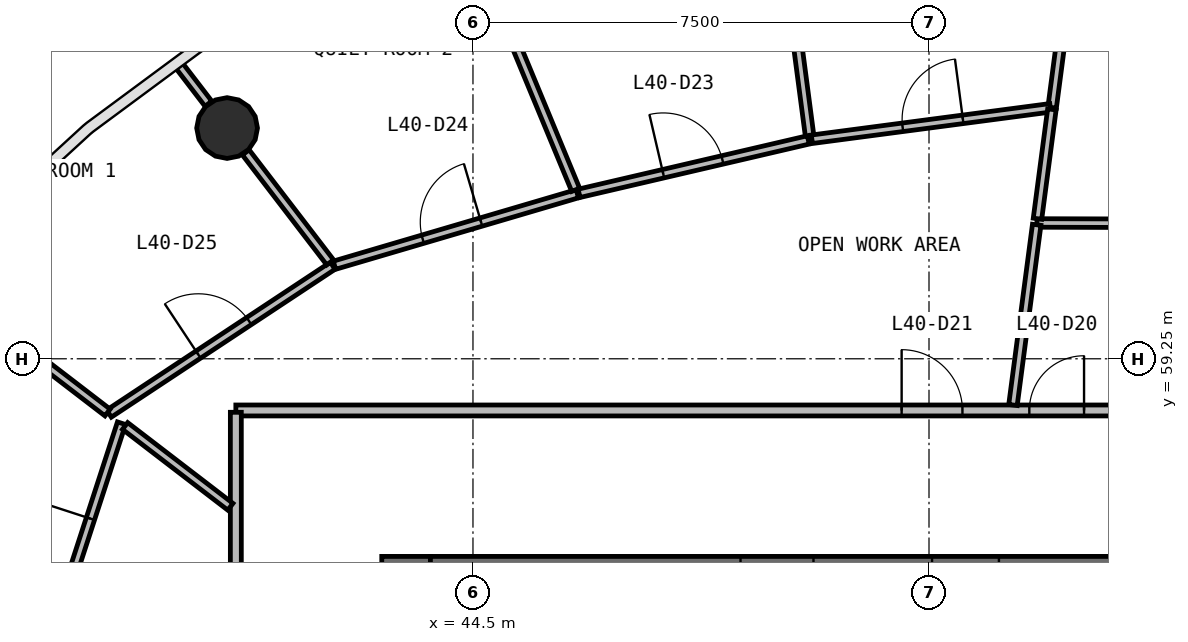
"""IFC4 building model, lengths in metres.
Left out: names, types, materials, properties, quantities, classifications, styles, units other than length and angle.
Written with IfcOpenShell. Run it as: python <this file> out.ifc"""

import sys

from ifc_helpers import new_model, si_unit, direction, frame, frame_2d, origin, origin_2d, place, context, subcontext, project, spatial, rectangle, circle, extrude, source, transform, mapped, element, fill, save


model = new_model("IFC4")
c1 = context("Model", 3, precision=1e-05, world=origin(), true_north=direction((0.0, 1.0)))
c2 = subcontext(c1, "Body", "Model", "MODEL_VIEW")
j1 = project(units=[si_unit("LENGTHUNIT", "METRE"), si_unit("PLANEANGLEUNIT", "RADIAN")], contexts=[c1])
p1 = place(None, origin())
s1 = spatial("IfcSite", under=j1, at=p1, CompositionType="ELEMENT")
p2 = place(p1, origin())
s2 = spatial("IfcBuilding", under=s1, at=p2, CompositionType="ELEMENT")
p3 = place(p2, frame((0.0, 0.0, 168.2)))
s3 = spatial("IfcBuildingStorey", under=s2, at=p3, CompositionType="ELEMENT", Elevation=168.2)
p4 = place(p3, frame((43.4, 56.0, 0.0), z_axis=(0.0, 0.0, 1.0), x_axis=(0.0, -1.0, 0.0)))
e1 = element("IfcWall", 1, at=p4, inside=s3, PredefinedType="SHEAR", context=c2, shape_type="SweptSolid", body=[
    extrude(rectangle(XDim=16.0, YDim=0.8, at=frame_2d((8.0, 0.0))), origin(), (0.0, 0.0, 1.0), 3.9),
])
p5 = place(p4, frame((7.1, 0.0, 0.0)))
e2 = element("IfcOpeningElement", 2, at=p5, cuts=e1, PredefinedType="OPENING", context=c2, shape_type="SweptSolid", body=[
    extrude(rectangle(XDim=1.8, YDim=2.1, at=frame_2d((0.9, 1.05))), frame((0.0, 0.41, 0.0), z_axis=(0.0, -1.0, 0.0), x_axis=(1.0, 0.0, 0.0)), (0.0, 0.0, 1.0), 0.82),
])
p6 = place(p3, frame((60.2, 55.6, 0.0), z_axis=(0.0, 0.0, 1.0), x_axis=(-1.0, 0.0, 0.0)))
e3 = element("IfcWall", 3, at=p6, inside=s3, PredefinedType="SHEAR", context=c2, shape_type="SweptSolid", body=[
    extrude(rectangle(XDim=16.4, YDim=0.8, at=frame_2d((8.2, 0.0))), origin(), (0.0, 0.0, 1.0), 3.9),
])
p7 = place(p6, frame((0.2, 0.0, 0.0)))
e4 = element("IfcOpeningElement", 4, at=p7, cuts=e3, PredefinedType="OPENING", context=c2, shape_type="SweptSolid", body=[
    extrude(rectangle(XDim=1.1, YDim=2.1, at=frame_2d((0.55, 1.05))), frame((0.0, 0.41, 0.0), z_axis=(0.0, -1.0, 0.0), x_axis=(1.0, 0.0, 0.0)), (0.0, 0.0, 1.0), 0.82),
])
p8 = place(p6, frame((10.1, 0.0, 0.0)))
e5 = element("IfcOpeningElement", 5, at=p8, cuts=e3, PredefinedType="OPENING", context=c2, shape_type="SweptSolid", body=[
    extrude(rectangle(XDim=1.2, YDim=2.1, at=frame_2d((0.6, 1.05))), frame((0.0, 0.41, 0.0), z_axis=(0.0, -1.0, 0.0), x_axis=(1.0, 0.0, 0.0)), (0.0, 0.0, 1.0), 0.82),
])
p9 = place(p6, frame((7.05, 0.0, 0.0)))
e6 = element("IfcOpeningElement", 6, at=p9, cuts=e3, PredefinedType="OPENING", context=c2, shape_type="SweptSolid", body=[
    extrude(rectangle(XDim=1.1, YDim=2.1, at=frame_2d((0.55, 1.05))), frame((0.0, 0.41, 0.0), z_axis=(0.0, -1.0, 0.0), x_axis=(1.0, 0.0, 0.0)), (0.0, 0.0, 1.0), 0.82),
])
m1 = source(origin(), c2, "Body", "SweptSolid", [
    extrude(circle(Radius=0.5, at=origin_2d()), origin(), (0.0, 0.0, 1.0), 3.9),
])
p10 = place(p3, frame((40.456, 63.044, 0.0), z_axis=(0.0, 0.0, 1.0), x_axis=(1.0, 0.0, 0.0)))
e7 = element("IfcColumn", 7, at=p10, inside=s3, PredefinedType="COLUMN", context=c2, shape_type="MappedRepresentation", body=[
    mapped(m1, transform((0.0, 0.0, 0.0), scale=1.0)),
])
p11 = place(p3, frame((40.6, 58.4, 0.0), z_axis=(0.0, 0.0, 1.0), x_axis=(1.0, 0.0, 0.0)))
e8 = element("IfcWall", 8, at=p11, inside=s3, PredefinedType="PARTITIONING", context=c2, shape_type="SweptSolid", body=[
    extrude(rectangle(XDim=22.8, YDim=0.18, at=frame_2d((11.4, 0.0))), origin(), (0.0, 0.0, 1.0), 2.88),
])
p12 = place(p11, frame((16.05, 0.0, 0.0)))
e9 = element("IfcOpeningElement", 9, at=p12, cuts=e8, PredefinedType="OPENING", context=c2, shape_type="SweptSolid", body=[
    extrude(rectangle(XDim=0.9, YDim=2.1, at=frame_2d((0.45, 1.05))), frame((0.0, 0.1, 0.0), z_axis=(0.0, -1.0, 0.0), x_axis=(1.0, 0.0, 0.0)), (0.0, 0.0, 1.0), 0.2),
])
p13 = place(p11, frame((13.05, 0.0, 0.0)))
e10 = element("IfcOpeningElement", 10, at=p13, cuts=e8, PredefinedType="OPENING", context=c2, shape_type="SweptSolid", body=[
    extrude(rectangle(XDim=0.9, YDim=2.1, at=frame_2d((0.45, 1.05))), frame((0.0, 0.1, 0.0), z_axis=(0.0, -1.0, 0.0), x_axis=(1.0, 0.0, 0.0)), (0.0, 0.0, 1.0), 0.2),
])
p14 = place(p11, frame((10.95, 0.0, 0.0)))
e11 = element("IfcOpeningElement", 11, at=p14, cuts=e8, PredefinedType="OPENING", context=c2, shape_type="SweptSolid", body=[
    extrude(rectangle(XDim=1.0, YDim=2.1, at=frame_2d((0.5, 1.05))), frame((0.0, 0.1, 0.0), z_axis=(0.0, -1.0, 0.0), x_axis=(1.0, 0.0, 0.0)), (0.0, 0.0, 1.0), 0.2),
])
p15 = place(p11, frame((19.95, 0.0, 0.0)))
e12 = element("IfcOpeningElement", 12, at=p15, cuts=e8, PredefinedType="OPENING", context=c2, shape_type="SweptSolid", body=[
    extrude(rectangle(XDim=1.0, YDim=2.1, at=frame_2d((0.5, 1.05))), frame((0.0, 0.1, 0.0), z_axis=(0.0, -1.0, 0.0), x_axis=(1.0, 0.0, 0.0)), (0.0, 0.0, 1.0), 0.2),
])
p16 = place(p3, frame((40.6, 37.63, 0.0), z_axis=(0.0, 0.0, 1.0), x_axis=(0.0, 1.0, 0.0)))
e13 = element("IfcWall", 13, at=p16, inside=s3, PredefinedType="PARTITIONING", context=c2, shape_type="SweptSolid", body=[
    extrude(rectangle(XDim=20.74, YDim=0.18, at=frame_2d((10.37, 0.0))), origin(), (0.0, 0.0, 1.0), 2.88),
])
p17 = place(p16, frame((12.09, 0.0, 0.0)))
e14 = element("IfcOpeningElement", 14, at=p17, cuts=e13, PredefinedType="OPENING", context=c2, shape_type="SweptSolid", body=[
    extrude(rectangle(XDim=1.0, YDim=2.1, at=frame_2d((0.5, 1.05))), frame((0.0, 0.1, 0.0), z_axis=(0.0, -1.0, 0.0), x_axis=(1.0, 0.0, 0.0)), (0.0, 0.0, 1.0), 0.2),
])
p18 = place(p16, frame((9.89, 0.0, 0.0)))
e15 = element("IfcOpeningElement", 15, at=p18, cuts=e13, PredefinedType="OPENING", context=c2, shape_type="SweptSolid", body=[
    extrude(rectangle(XDim=1.0, YDim=2.1, at=frame_2d((0.5, 1.05))), frame((0.0, 0.1, 0.0), z_axis=(0.0, -1.0, 0.0), x_axis=(1.0, 0.0, 0.0)), (0.0, 0.0, 1.0), 0.2),
])
p19 = place(p3, frame((54.66, 68.205, 0.0), z_axis=(0.0, 0.0, 1.0), x_axis=(-0.130559647123, -0.991440456378, 0.0)))
e16 = element("IfcWall", 16, at=p19, inside=s3, PredefinedType="PARTITIONING", context=c2, shape_type="SweptSolid", body=[
    extrude(rectangle(XDim=4.866, YDim=0.14, at=frame_2d((2.433, 0.0))), origin(), (0.0, 0.0, 1.0), 2.88),
])
p20 = place(p19, frame((2.016, 0.0, 0.0)))
e17 = element("IfcOpeningElement", 17, at=p20, cuts=e16, PredefinedType="OPENING", context=c2, shape_type="SweptSolid", body=[
    extrude(rectangle(XDim=1.0, YDim=2.1, at=frame_2d((0.5, 1.05))), frame((0.0, 0.08, 0.0), z_axis=(0.0, -1.0, 0.0), x_axis=(1.0, 0.0, 0.0)), (0.0, 0.0, 1.0), 0.16),
])
p21 = place(p3, frame((38.514, 58.348, 0.0), z_axis=(0.0, 0.0, 1.0), x_axis=(0.834249384929, 0.551387308292, 0.0)))
e18 = element("IfcWall", 18, at=p21, inside=s3, PredefinedType="PARTITIONING", context=c2, shape_type="SweptSolid", body=[
    extrude(rectangle(XDim=4.41, YDim=0.14, at=frame_2d((2.205, 0.0))), origin(), (0.0, 0.0, 1.0), 2.88),
])
p22 = place(p21, frame((1.76, 0.0, 0.0)))
e19 = element("IfcOpeningElement", 19, at=p22, cuts=e18, PredefinedType="OPENING", context=c2, shape_type="SweptSolid", body=[
    extrude(rectangle(XDim=1.0, YDim=2.1, at=frame_2d((0.5, 1.05))), frame((0.0, 0.08, 0.0), z_axis=(0.0, -1.0, 0.0), x_axis=(1.0, 0.0, 0.0)), (0.0, 0.0, 1.0), 0.16),
])
p23 = place(p3, frame((37.375, 54.058, 0.0), z_axis=(0.0, 0.0, 1.0), x_axis=(0.309393484324, 0.950934104898, 0.0)))
e20 = element("IfcWall", 20, at=p23, inside=s3, PredefinedType="PARTITIONING", context=c2, shape_type="SweptSolid", body=[
    extrude(rectangle(XDim=4.345, YDim=0.14, at=frame_2d((2.173, 0.0))), origin(), (0.0, 0.0, 1.0), 2.88),
])
p24 = place(p23, frame((1.696, 0.0, 0.0)))
e21 = element("IfcOpeningElement", 21, at=p24, cuts=e20, PredefinedType="OPENING", context=c2, shape_type="SweptSolid", body=[
    extrude(rectangle(XDim=1.0, YDim=2.1, at=frame_2d((0.5, 1.05))), frame((0.0, 0.08, 0.0), z_axis=(0.0, -1.0, 0.0), x_axis=(1.0, 0.0, 0.0)), (0.0, 0.0, 1.0), 0.16),
])
p25 = place(p3, frame((50.044, 62.856, 0.0), z_axis=(0.0, 0.0, 1.0), x_axis=(-0.130515707309, 0.991446241682, 0.0)))
e22 = element("IfcWall", 22, at=p25, inside=s3, PredefinedType="PARTITIONING", context=c2, shape_type="SweptSolid", body=[
    extrude(rectangle(XDim=4.231, YDim=0.14, at=frame_2d((2.116, 0.0))), origin(), (0.0, 0.0, 1.0), 2.88),
])
p26 = place(p3, frame((42.222, 60.789, 0.0), z_axis=(0.0, 0.0, 1.0), x_axis=(0.959320664993, 0.282318723638, 0.0)))
e23 = element("IfcWall", 23, at=p26, inside=s3, PredefinedType="PARTITIONING", context=c2, shape_type="SweptSolid", body=[
    extrude(rectangle(XDim=4.163, YDim=0.14, at=frame_2d((2.082, 0.0))), origin(), (0.0, 0.0, 1.0), 2.88),
])
p27 = place(p26, frame((1.513, 0.0, 0.0)))
e24 = element("IfcOpeningElement", 24, at=p27, cuts=e23, PredefinedType="OPENING", context=c2, shape_type="SweptSolid", body=[
    extrude(rectangle(XDim=1.0, YDim=2.1, at=frame_2d((0.5, 1.05))), frame((0.0, 0.08, 0.0), z_axis=(0.0, -1.0, 0.0), x_axis=(1.0, 0.0, 0.0)), (0.0, 0.0, 1.0), 0.16),
])
p28 = place(p3, frame((50.074, 62.86, 0.0), z_axis=(0.0, 0.0, 1.0), x_axis=(0.991416645942, 0.130740330995, 0.0)))
e25 = element("IfcWall", 25, at=p28, inside=s3, PredefinedType="PARTITIONING", context=c2, shape_type="SweptSolid", body=[
    extrude(rectangle(XDim=3.955, YDim=0.14, at=frame_2d((1.978, 0.0))), origin(), (0.0, 0.0, 1.0), 2.88),
])
p29 = place(p28, frame((1.505, 0.0, 0.0)))
e26 = element("IfcOpeningElement", 26, at=p29, cuts=e25, PredefinedType="OPENING", context=c2, shape_type="SweptSolid", body=[
    extrude(rectangle(XDim=1.0, YDim=2.1, at=frame_2d((0.5, 1.05))), frame((0.0, 0.08, 0.0), z_axis=(0.0, -1.0, 0.0), x_axis=(1.0, 0.0, 0.0)), (0.0, 0.0, 1.0), 0.16),
])
p30 = place(p3, frame((46.245, 61.971, 0.0), z_axis=(0.0, 0.0, 1.0), x_axis=(0.973895613849, 0.22699632888, 0.0)))
e27 = element("IfcWall", 27, at=p30, inside=s3, PredefinedType="PARTITIONING", context=c2, shape_type="SweptSolid", body=[
    extrude(rectangle(XDim=3.871, YDim=0.14, at=frame_2d((1.936, 0.0))), origin(), (0.0, 0.0, 1.0), 2.88),
])
p31 = place(p30, frame((1.421, 0.0, 0.0)))
e28 = element("IfcOpeningElement", 28, at=p31, cuts=e27, PredefinedType="OPENING", context=c2, shape_type="SweptSolid", body=[
    extrude(rectangle(XDim=1.0, YDim=2.1, at=frame_2d((0.5, 1.05))), frame((0.0, 0.08, 0.0), z_axis=(0.0, -1.0, 0.0), x_axis=(1.0, 0.0, 0.0)), (0.0, 0.0, 1.0), 0.16),
])
p32 = place(p3, frame((57.551, 61.473, 0.0), z_axis=(0.0, 0.0, 1.0), x_axis=(-0.999996312209, 0.002715799878, 0.0)))
e29 = element("IfcWall", 29, at=p32, inside=s3, PredefinedType="PARTITIONING", context=c2, shape_type="SweptSolid", body=[
    extrude(rectangle(XDim=3.776, YDim=0.14, at=frame_2d((1.888, 0.0))), origin(), (0.0, 0.0, 1.0), 2.88),
])
p33 = place(p3, frame((46.189, 62.029, 0.0), z_axis=(0.0, 0.0, 1.0), x_axis=(-0.382706061459, 0.923870158909, 0.0)))
e30 = element("IfcWall", 30, at=p33, inside=s3, PredefinedType="PARTITIONING", context=c2, shape_type="SweptSolid", body=[
    extrude(rectangle(XDim=3.388, YDim=0.14, at=frame_2d((1.694, 0.0))), origin(), (0.0, 0.0, 1.0), 2.88),
])
p34 = place(p3, frame((53.381, 58.49, 0.0), z_axis=(0.0, 0.0, 1.0), x_axis=(0.130505214289, 0.991447622945, 0.0)))
e31 = element("IfcWall", 31, at=p34, inside=s3, PredefinedType="PARTITIONING", context=c2, shape_type="SweptSolid", body=[
    extrude(rectangle(XDim=2.99, YDim=0.14, at=frame_2d((1.495, 0.0))), origin(), (0.0, 0.0, 1.0), 2.88),
])
p35 = place(p3, frame((40.51, 56.817, 0.0), z_axis=(0.0, 0.0, 1.0), x_axis=(-0.793401046591, 0.608699251904, 0.0)))
e32 = element("IfcWall", 32, at=p35, inside=s3, PredefinedType="PARTITIONING", context=c2, shape_type="SweptSolid", body=[
    extrude(rectangle(XDim=2.182, YDim=0.14, at=frame_2d((1.091, 0.0))), origin(), (0.0, 0.0, 1.0), 2.88),
])
p36 = place(p3, frame((42.151, 60.836, 0.0), z_axis=(0.0, 0.0, 1.0), x_axis=(-0.608721584344, 0.793383912588, 0.0)))
e33 = element("IfcWall", 33, at=p36, inside=s3, PredefinedType="PARTITIONING", context=c2, shape_type="SweptSolid", body=[
    extrude(rectangle(XDim=2.279, YDim=0.14, at=frame_2d((1.14, 0.0))), origin(), (0.0, 0.0, 1.0), 2.88),
])
p37 = place(p3, frame((53.784, 61.553, 0.0), z_axis=(0.0, 0.0, 1.0), x_axis=(0.1305938182, 0.991435955898, 0.0)))
e34 = element("IfcWall", 34, at=p37, inside=s3, PredefinedType="PARTITIONING", context=c2, shape_type="SweptSolid", body=[
    extrude(rectangle(XDim=1.813, YDim=0.14, at=frame_2d((0.907, 0.0))), origin(), (0.0, 0.0, 1.0), 2.88),
])
p38 = place(p3, frame((38.49, 58.366, 0.0), z_axis=(0.0, 0.0, 1.0), x_axis=(-0.793284917906, 0.608850588422, 0.0)))
e35 = element("IfcWall", 35, at=p38, inside=s3, PredefinedType="PARTITIONING", context=c2, shape_type="SweptSolid", body=[
    extrude(rectangle(XDim=1.798, YDim=0.14, at=frame_2d((0.899, 0.0))), origin(), (0.0, 0.0, 1.0), 2.88),
])
p39 = place(p3, frame((40.149, 63.445, 0.0), z_axis=(0.0, 0.0, 1.0), x_axis=(-0.608868847335, 0.793270903755, 0.0)))
e36 = element("IfcWall", 36, at=p39, inside=s3, PredefinedType="PARTITIONING", context=c2, shape_type="SweptSolid", body=[
    extrude(rectangle(XDim=0.785, YDim=0.14, at=frame_2d((0.393, 0.0))), origin(), (0.0, 0.0, 1.0), 2.88),
])
m2 = source(origin(), c2, "Body", "SweptSolid", [
    extrude(rectangle(XDim=0.9, YDim=2.1, at=frame_2d((0.45, 1.05))), frame((0.0, 0.025, 0.0), z_axis=(0.0, -1.0, 0.0), x_axis=(1.0, 0.0, 0.0)), (0.0, 0.0, 1.0), 0.05),
])
p40 = place(p13, origin())
e37 = element("IfcDoor", 37, at=p40, inside=s3, OperationType="SINGLE_SWING_RIGHT", PredefinedType="DOOR", context=c2, shape_type="MappedRepresentation", body=[
    mapped(m2, transform((0.0, 0.0, 0.0), scale=1.0)),
])
fill(e10, e37)
m3 = source(origin(), c2, "Body", "SweptSolid", [
    extrude(rectangle(XDim=1.0, YDim=2.1, at=frame_2d((0.5, 1.05))), frame((0.0, 0.025, 0.0), z_axis=(0.0, -1.0, 0.0), x_axis=(1.0, 0.0, 0.0)), (0.0, 0.0, 1.0), 0.05),
])
p41 = place(p14, origin())
e38 = element("IfcDoor", 38, at=p41, inside=s3, OperationType="SINGLE_SWING_LEFT", PredefinedType="DOOR", context=c2, shape_type="MappedRepresentation", body=[
    mapped(m3, transform((0.0, 0.0, 0.0), scale=1.0)),
])
fill(e11, e38)
p42 = place(p29, origin())
e39 = element("IfcDoor", 39, at=p42, inside=s3, OperationType="SINGLE_SWING_RIGHT", PredefinedType="DOOR", context=c2, shape_type="MappedRepresentation", body=[
    mapped(m3, transform((0.0, 0.0, 0.0), scale=1.0)),
])
fill(e26, e39)
p43 = place(p31, origin())
e40 = element("IfcDoor", 40, at=p43, inside=s3, OperationType="SINGLE_SWING_LEFT", PredefinedType="DOOR", context=c2, shape_type="MappedRepresentation", body=[
    mapped(m3, transform((0.0, 0.0, 0.0), scale=1.0)),
])
fill(e28, e40)
p44 = place(p27, origin())
e41 = element("IfcDoor", 41, at=p44, inside=s3, OperationType="SINGLE_SWING_RIGHT", PredefinedType="DOOR", context=c2, shape_type="MappedRepresentation", body=[
    mapped(m3, transform((0.0, 0.0, 0.0), scale=1.0)),
])
fill(e24, e41)
p45 = place(p22, origin())
e42 = element("IfcDoor", 42, at=p45, inside=s3, OperationType="SINGLE_SWING_LEFT", PredefinedType="DOOR", context=c2, shape_type="MappedRepresentation", body=[
    mapped(m3, transform((0.0, 0.0, 0.0), scale=1.0)),
])
fill(e19, e42)
p46 = place(p24, origin())
e43 = element("IfcDoor", 43, at=p46, inside=s3, OperationType="SINGLE_SWING_RIGHT", PredefinedType="DOOR", context=c2, shape_type="MappedRepresentation", body=[
    mapped(m3, transform((0.0, 0.0, 0.0), scale=1.0)),
])
fill(e21, e43)
save(model, sys.argv[1])
